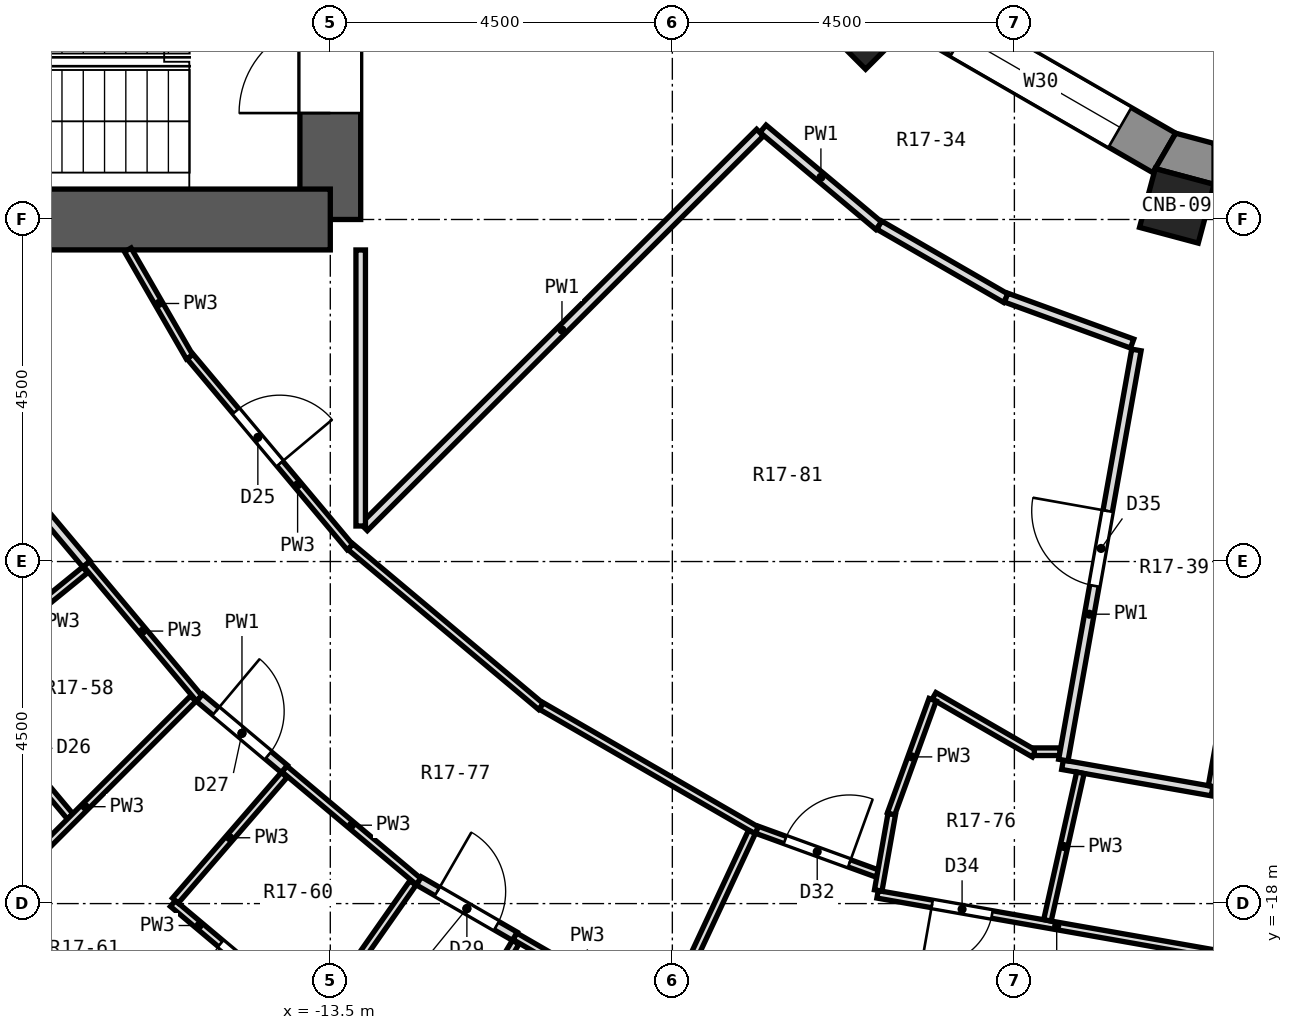
"""IFC4 building model, lengths in metres.
Left out: names, types, materials, properties, quantities, classifications, styles, units other than length and angle.
Written with IfcOpenShell. Run it as: python <this file> out.ifc"""

import sys

from ifc_helpers import new_model, si_unit, direction, frame, frame_2d, origin, origin_2d, place, context, subcontext, project, spatial, polyline, rectangle, outline, extrude, element, fill, save


model = new_model("IFC4")
c1 = context("Model", 3, precision=1e-05, world=origin(), true_north=direction((0.0, 1.0)))
c2 = subcontext(c1, "Body", "Model", "MODEL_VIEW")
j1 = project(units=[si_unit("LENGTHUNIT", "METRE"), si_unit("PLANEANGLEUNIT", "RADIAN")], contexts=[c1])
p1 = place(None, origin())
s1 = spatial("IfcSite", under=j1, at=p1, CompositionType="ELEMENT")
p2 = place(p1, origin())
s2 = spatial("IfcBuilding", under=s1, at=p2, CompositionType="ELEMENT")
p3 = place(p2, frame((0.0, 0.0, 91.9)))
s3 = spatial("IfcBuildingStorey", under=s2, at=p3, CompositionType="ELEMENT", Elevation=91.9)
for number, where, z_axis, x_axis in (
    (1, (-6.458, -6.458, 0.0), (0.0, 0.0, 1.0), (-0.707, -0.707, 0.0)),
    (2, (-2.364, -8.821, 0.0), (0.0, 0.0, 1.0), (-0.259, -0.966, 0.0)),
):
    element("IfcColumn", number, at=place(p3, frame(where, z_axis=z_axis, x_axis=x_axis)), inside=s3, PredefinedType="COLUMN", context=c2, shape_type="SweptSolid", body=[
        extrude(rectangle(XDim=0.8, YDim=0.8, at=origin_2d()), origin(), (0.0, 0.0, 1.0), 3.3),
    ])
p4 = place(p3, frame((-13.5, -9.0, 0.0), z_axis=(0.0, 0.0, 1.0), x_axis=(0.0, 1.0, 0.0)))
e3 = element("IfcWall", 3, at=p4, inside=s3, PredefinedType="SHEAR", context=c2, shape_type="SweptSolid", body=[
    extrude(rectangle(XDim=18.0, YDim=0.8, at=frame_2d((9.0, 0.0))), origin(), (0.0, 0.0, 1.0), 3.3),
])
p5 = place(p4, frame((15.4, 0.0, 0.0)))
e4 = element("IfcOpeningElement", 4, at=p5, cuts=e3, PredefinedType="OPENING", context=c2, shape_type="SweptSolid", body=[
    extrude(rectangle(XDim=1.2, YDim=2.1, at=frame_2d((0.6, 1.05))), frame((0.0, 0.412, 0.0), z_axis=(0.0, -1.0, 0.0), x_axis=(1.0, 0.0, 0.0)), (0.0, 0.0, 1.0), 0.824),
])
p6 = place(p4, frame((1.4, 0.0, 0.0)))
e5 = element("IfcOpeningElement", 5, at=p6, cuts=e3, PredefinedType="OPENING", context=c2, shape_type="SweptSolid", body=[
    extrude(rectangle(XDim=1.2, YDim=2.1, at=frame_2d((0.6, 1.05))), frame((0.0, 0.412, 0.0), z_axis=(0.0, -1.0, 0.0), x_axis=(1.0, 0.0, 0.0)), (0.0, 0.0, 1.0), 0.824),
])
p7 = place(p4, frame((7.5, 0.0, 0.0)))
e6 = element("IfcOpeningElement", 6, at=p7, cuts=e3, PredefinedType="OPENING", context=c2, shape_type="SweptSolid", body=[
    extrude(rectangle(XDim=3.0, YDim=2.4, at=frame_2d((1.5, 1.2))), frame((0.0, 0.412, 0.0), z_axis=(0.0, -1.0, 0.0), x_axis=(1.0, 0.0, 0.0)), (0.0, 0.0, 1.0), 0.824),
])
p8 = place(p3, frame((-13.5, -9.0, 0.0), z_axis=(0.0, 0.0, 1.0), x_axis=(-1.0, 0.0, 0.0)))
e7 = element("IfcWall", 7, at=p8, inside=s3, PredefinedType="SHEAR", context=c2, shape_type="SweptSolid", body=[
    extrude(rectangle(XDim=10.4, YDim=0.8, at=frame_2d((5.2, 0.0))), origin(), (0.0, 0.0, 1.0), 3.3),
])
p9 = place(p3, frame((-5.773, -6.251, 0.0), z_axis=(0.0, 0.0, 1.0), x_axis=(0.86604563398, -0.499964958637, 0.0)))
e8 = element("IfcWall", 8, at=p9, inside=s3, PredefinedType="SOLIDWALL", context=c2, shape_type="SweptSolid", body=[
    extrude(rectangle(XDim=3.747, YDim=0.6, at=frame_2d((1.874, 0.0))), origin(), (0.0, 0.0, 1.0), 2.8),
])
p10 = place(p9, frame((0.674, 0.0, 0.9)))
e9 = element("IfcOpeningElement", 9, at=p10, cuts=e8, PredefinedType="OPENING", context=c2, shape_type="SweptSolid", body=[
    extrude(rectangle(XDim=2.4, YDim=1.8, at=frame_2d((1.2, 0.9))), frame((0.0, 0.312, 0.0), z_axis=(0.0, -1.0, 0.0), x_axis=(1.0, 0.0, 0.0)), (0.0, 0.0, 1.0), 0.624),
])
p11 = place(p3, origin())
e10 = element("IfcWall", 10, at=p11, inside=s3, PredefinedType="SOLIDWALL", context=c2, shape_type="SweptSolid", body=[
    extrude(outline(polyline([(-1.874, -8.538), (-1.874, -8.0), (-2.377, -7.865), (-2.646, -8.331), (-1.874, -8.538)])), origin(), (0.0, 0.0, 1.0), 2.8),
])
p12 = place(p3, frame((-16.164, -9.4, 0.0), z_axis=(0.0, 0.0, 1.0), x_axis=(0.499687832671, -0.866205558676, 0.0)))
e11 = element("IfcWall", 11, at=p12, inside=s3, PredefinedType="PARTITIONING", context=c2, shape_type="SweptSolid", body=[
    extrude(rectangle(XDim=1.628, YDim=0.1, at=frame_2d((0.814, 0.0))), origin(), (0.0, 0.0, 1.0), 2.8),
])
p13 = place(p3, frame((-18.46, -15.022, 0.0), z_axis=(0.0, 0.0, 1.0), x_axis=(0.642942941421, -0.765914077477, 0.0)))
e12 = element("IfcWall", 12, at=p13, inside=s3, PredefinedType="PARTITIONING", context=c2, shape_type="SweptSolid", body=[
    extrude(rectangle(XDim=2.39, YDim=0.1, at=frame_2d((1.195, 0.0))), origin(), (0.0, 0.0, 1.0), 2.8),
])
p14 = place(p13, frame((0.821, 0.0, 0.0)))
e13 = element("IfcOpeningElement", 13, at=p14, cuts=e12, PredefinedType="OPENING", context=c2, shape_type="SweptSolid", body=[
    extrude(rectangle(XDim=0.8, YDim=2.1, at=frame_2d((0.4, 1.05))), frame((0.0, 0.062, 0.0), z_axis=(0.0, -1.0, 0.0), x_axis=(1.0, 0.0, 0.0)), (0.0, 0.0, 1.0), 0.124),
])
p15 = place(p3, frame((-16.708, -13.532, 0.0), z_axis=(0.0, 0.0, 1.0), x_axis=(0.642762571273, -0.766065452145, 0.0)))
e14 = element("IfcWall", 14, at=p15, inside=s3, PredefinedType="PARTITIONING", context=c2, shape_type="SweptSolid", body=[
    extrude(rectangle(XDim=2.307, YDim=0.1, at=frame_2d((1.153, 0.0))), origin(), (0.0, 0.0, 1.0), 2.8),
])
p16 = place(p3, frame((-17.637, -12.425, 0.0), z_axis=(0.0, 0.0, 1.0), x_axis=(0.642641061866, -0.766167387458, 0.0)))
e15 = element("IfcWall", 15, at=p16, inside=s3, PredefinedType="PARTITIONING", context=c2, shape_type="SweptSolid", body=[
    extrude(rectangle(XDim=1.445, YDim=0.125, at=frame_2d((0.722, 0.0))), origin(), (0.0, 0.0, 1.0), 2.8),
])
p17 = place(p3, frame((-15.344, -10.804, 0.0), z_axis=(0.0, 0.0, 1.0), x_axis=(0.642602374159, -0.766199836025, 0.0)))
e16 = element("IfcWall", 16, at=p17, inside=s3, PredefinedType="PARTITIONING", context=c2, shape_type="SweptSolid", body=[
    extrude(rectangle(XDim=3.273, YDim=0.1, at=frame_2d((1.636, 0.0))), origin(), (0.0, 0.0, 1.0), 2.8),
])
p18 = place(p17, frame((0.936, 0.0, 0.0)))
e17 = element("IfcOpeningElement", 17, at=p18, cuts=e16, PredefinedType="OPENING", context=c2, shape_type="SweptSolid", body=[
    extrude(rectangle(XDim=0.9, YDim=2.1, at=frame_2d((0.45, 1.05))), frame((0.0, 0.062, 0.0), z_axis=(0.0, -1.0, 0.0), x_axis=(1.0, 0.0, 0.0)), (0.0, 0.0, 1.0), 0.124),
])
p19 = place(p3, frame((-15.571, -17.999, 0.0), z_axis=(0.0, 0.0, 1.0), x_axis=(0.765914077477, -0.642942941421, 0.0)))
e18 = element("IfcWall", 18, at=p19, inside=s3, PredefinedType="PARTITIONING", context=c2, shape_type="SweptSolid", body=[
    extrude(rectangle(XDim=2.39, YDim=0.1, at=frame_2d((1.195, 0.0))), origin(), (0.0, 0.0, 1.0), 2.8),
])
p20 = place(p19, frame((0.82, 0.0, 0.0)))
e19 = element("IfcOpeningElement", 19, at=p20, cuts=e18, PredefinedType="OPENING", context=c2, shape_type="SweptSolid", body=[
    extrude(rectangle(XDim=0.8, YDim=2.1, at=frame_2d((0.4, 1.05))), frame((0.0, 0.062, 0.0), z_axis=(0.0, -1.0, 0.0), x_axis=(1.0, 0.0, 0.0)), (0.0, 0.0, 1.0), 0.124),
])
p21 = place(p3, frame((-14.104, -16.228, 0.0), z_axis=(0.0, 0.0, 1.0), x_axis=(0.76604687987, -0.642784705669, 0.0)))
e20 = element("IfcWall", 20, at=p21, inside=s3, PredefinedType="PARTITIONING", context=c2, shape_type="SweptSolid", body=[
    extrude(rectangle(XDim=2.305, YDim=0.1, at=frame_2d((1.153, 0.0))), origin(), (0.0, 0.0, 1.0), 2.8),
])
p22 = place(p3, frame((-15.22, -15.292, 0.0), z_axis=(0.0, 0.0, 1.0), x_axis=(0.766114305984, -0.642704341177, 0.0)))
e21 = element("IfcWall", 21, at=p22, inside=s3, PredefinedType="PARTITIONING", context=c2, shape_type="SweptSolid", body=[
    extrude(rectangle(XDim=1.456, YDim=0.125, at=frame_2d((0.728, 0.0))), origin(), (0.0, 0.0, 1.0), 2.8),
])
p23 = place(p22, frame((0.278, 0.0, 0.0)))
e22 = element("IfcOpeningElement", 22, at=p23, cuts=e21, PredefinedType="OPENING", context=c2, shape_type="SweptSolid", body=[
    extrude(rectangle(XDim=0.9, YDim=2.1, at=frame_2d((0.45, 1.05))), frame((0.0, 0.074, 0.0), z_axis=(0.0, -1.0, 0.0), x_axis=(1.0, 0.0, 0.0)), (0.0, 0.0, 1.0), 0.149),
])
p24 = place(p3, frame((-13.235, -13.305, 0.0), z_axis=(0.0, 0.0, 1.0), x_axis=(0.766132303871, -0.642682886784, 0.0)))
e23 = element("IfcWall", 23, at=p24, inside=s3, PredefinedType="PARTITIONING", context=c2, shape_type="SweptSolid", body=[
    extrude(rectangle(XDim=3.273, YDim=0.1, at=frame_2d((1.636, 0.0))), origin(), (0.0, 0.0, 1.0), 2.8),
])
p25 = place(p3, frame((-7.807, -7.806, 0.0), z_axis=(0.0, 0.0, 1.0), x_axis=(0.766164240715, -0.642644813446, 0.0)))
e24 = element("IfcWall", 24, at=p25, inside=s3, PredefinedType="PARTITIONING", context=c2, shape_type="SweptSolid", body=[
    extrude(rectangle(XDim=1.988, YDim=0.125, at=frame_2d((0.994, 0.0))), origin(), (0.0, 0.0, 1.0), 2.8),
])
p26 = place(p3, frame((-11.072, -18.43, 0.0), z_axis=(0.0, 0.0, 1.0), x_axis=(0.865848017448, -0.500307116361, 0.0)))
e25 = element("IfcWall", 25, at=p26, inside=s3, PredefinedType="PARTITIONING", context=c2, shape_type="SweptSolid", body=[
    extrude(rectangle(XDim=2.205, YDim=0.1, at=frame_2d((1.102, 0.0))), origin(), (0.0, 0.0, 1.0), 2.8),
])
p27 = place(p3, frame((-12.334, -17.702, 0.0), z_axis=(0.0, 0.0, 1.0), x_axis=(0.866110229381, -0.499853048967, 0.0)))
e26 = element("IfcWall", 26, at=p27, inside=s3, PredefinedType="PARTITIONING", context=c2, shape_type="SweptSolid", body=[
    extrude(rectangle(XDim=1.457, YDim=0.125, at=frame_2d((0.728, 0.0))), origin(), (0.0, 0.0, 1.0), 2.8),
])
p28 = place(p27, frame((0.278, 0.0, 0.0)))
e27 = element("IfcOpeningElement", 27, at=p28, cuts=e26, PredefinedType="OPENING", context=c2, shape_type="SweptSolid", body=[
    extrude(rectangle(XDim=0.9, YDim=2.1, at=frame_2d((0.45, 1.05))), frame((0.0, 0.074, 0.0), z_axis=(0.0, -1.0, 0.0), x_axis=(1.0, 0.0, 0.0)), (0.0, 0.0, 1.0), 0.149),
])
p29 = place(p3, frame((-10.723, -15.401, 0.0), z_axis=(0.0, 0.0, 1.0), x_axis=(0.866002935623, -0.500038913978, 0.0)))
e28 = element("IfcWall", 28, at=p29, inside=s3, PredefinedType="PARTITIONING", context=c2, shape_type="SweptSolid", body=[
    extrude(rectangle(XDim=3.272, YDim=0.1, at=frame_2d((1.636, 0.0))), origin(), (0.0, 0.0, 1.0), 2.8),
])
p30 = place(p3, frame((-5.557, -15.267, 0.0), z_axis=(0.0, 0.0, 1.0), x_axis=(0.866084140742, -0.499898250802, 0.0)))
e29 = element("IfcWall", 29, at=p30, inside=s3, PredefinedType="PARTITIONING", context=c2, shape_type="SweptSolid", body=[
    extrude(rectangle(XDim=1.523, YDim=0.1, at=frame_2d((0.761, 0.0))), origin(), (0.0, 0.0, 1.0), 2.8),
])
p31 = place(p3, frame((-6.278, -9.074, 0.0), z_axis=(0.0, 0.0, 1.0), x_axis=(0.865970077019, -0.500095816526, 0.0)))
e30 = element("IfcWall", 30, at=p31, inside=s3, PredefinedType="PARTITIONING", context=c2, shape_type="SweptSolid", body=[
    extrude(rectangle(XDim=1.924, YDim=0.125, at=frame_2d((0.962, 0.0))), origin(), (0.0, 0.0, 1.0), 2.8),
])
p32 = place(p3, frame((-7.886, -17.029, 0.0), z_axis=(0.0, 0.0, 1.0), x_axis=(0.939806110693, -0.341708171258, 0.0)))
e31 = element("IfcWall", 31, at=p32, inside=s3, PredefinedType="PARTITIONING", context=c2, shape_type="SweptSolid", body=[
    extrude(rectangle(XDim=1.686, YDim=0.1, at=frame_2d((0.843, 0.0))), origin(), (0.0, 0.0, 1.0), 2.8),
])
p33 = place(p32, frame((0.393, 0.0, 0.0)))
e32 = element("IfcOpeningElement", 32, at=p33, cuts=e31, PredefinedType="OPENING", context=c2, shape_type="SweptSolid", body=[
    extrude(rectangle(XDim=0.9, YDim=2.1, at=frame_2d((0.45, 1.05))), frame((0.0, 0.062, 0.0), z_axis=(0.0, -1.0, 0.0), x_axis=(1.0, 0.0, 0.0)), (0.0, 0.0, 1.0), 0.124),
])
p34 = place(p3, frame((-4.608, -10.028, 0.0), z_axis=(0.0, 0.0, 1.0), x_axis=(0.939587139824, -0.342309810958, 0.0)))
e33 = element("IfcWall", 33, at=p34, inside=s3, PredefinedType="PARTITIONING", context=c2, shape_type="SweptSolid", body=[
    extrude(rectangle(XDim=1.764, YDim=0.125, at=frame_2d((0.882, 0.0))), origin(), (0.0, 0.0, 1.0), 2.8),
])
p35 = place(p3, frame((-6.3, -17.878, 0.0), z_axis=(0.0, 0.0, 1.0), x_axis=(0.984813837489, -0.173613667348, 0.0)))
e34 = element("IfcWall", 34, at=p35, inside=s3, PredefinedType="PARTITIONING", context=c2, shape_type="SweptSolid", body=[
    extrude(rectangle(XDim=4.787, YDim=0.1, at=frame_2d((2.394, 0.0))), origin(), (0.0, 0.0, 1.0), 2.8),
])
p36 = place(p35, frame((0.729, 0.0, 0.0)))
e35 = element("IfcOpeningElement", 35, at=p36, cuts=e34, PredefinedType="OPENING", context=c2, shape_type="SweptSolid", body=[
    extrude(rectangle(XDim=0.8, YDim=2.1, at=frame_2d((0.4, 1.05))), frame((0.0, 0.062, 0.0), z_axis=(0.0, -1.0, 0.0), x_axis=(1.0, 0.0, 0.0)), (0.0, 0.0, 1.0), 0.124),
])
p37 = place(p3, frame((-3.867, -16.174, 0.0), z_axis=(0.0, 0.0, 1.0), x_axis=(0.984836400178, -0.173485633079, 0.0)))
e36 = element("IfcWall", 36, at=p37, inside=s3, PredefinedType="PARTITIONING", context=c2, shape_type="SweptSolid", body=[
    extrude(rectangle(XDim=1.998, YDim=0.125, at=frame_2d((0.999, 0.0))), origin(), (0.0, 0.0, 1.0), 2.8),
])
p38 = place(p3, frame((-4.238, -16.002, 0.0), z_axis=(0.0, 0.0, 1.0), x_axis=(1.0, 0.0, 0.0)))
e37 = element("IfcWall", 37, at=p38, inside=s3, PredefinedType="PARTITIONING", context=c2, shape_type="SweptSolid", body=[
    extrude(rectangle(XDim=0.339, YDim=0.1, at=frame_2d((0.169, 0.0))), origin(), (0.0, 0.0, 1.0), 2.8),
])
p39 = place(p3, frame((-18.419, -14.989, 0.0), z_axis=(0.0, 0.0, 1.0), x_axis=(0.775583643893, 0.63124481093, 0.0)))
e38 = element("IfcWall", 38, at=p39, inside=s3, PredefinedType="PARTITIONING", context=c2, shape_type="SweptSolid", body=[
    extrude(rectangle(XDim=2.184, YDim=0.1, at=frame_2d((1.092, 0.0))), origin(), (0.0, 0.0, 1.0), 2.8),
])
p40 = place(p3, frame((-13.057, -13.049, 0.0), z_axis=(0.0, 0.0, 1.0), x_axis=(0.708367099834, 0.705844212183, 0.0)))
e39 = element("IfcWall", 39, at=p40, inside=s3, PredefinedType="PARTITIONING", context=c2, shape_type="SweptSolid", body=[
    extrude(rectangle(XDim=7.354, YDim=0.125, at=frame_2d((3.677, 0.0))), origin(), (0.0, 0.0, 1.0), 2.8),
])
p41 = place(p3, frame((-18.148, -18.148, 0.0), z_axis=(0.0, 0.0, 1.0), x_axis=(0.707106781187, 0.707106781187, 0.0)))
e40 = element("IfcWall", 40, at=p41, inside=s3, PredefinedType="PARTITIONING", context=c2, shape_type="SweptSolid", body=[
    extrude(rectangle(XDim=4.023, YDim=0.1, at=frame_2d((2.011, 0.0))), origin(), (0.0, 0.0, 1.0), 2.8),
])
p42 = place(p3, frame((-15.538, -17.961, 0.0), z_axis=(0.0, 0.0, 1.0), x_axis=(0.654433202149, 0.756119821143, 0.0)))
e41 = element("IfcWall", 41, at=p42, inside=s3, PredefinedType="PARTITIONING", context=c2, shape_type="SweptSolid", body=[
    extrude(rectangle(XDim=2.187, YDim=0.1, at=frame_2d((1.094, 0.0))), origin(), (0.0, 0.0, 1.0), 2.8),
])
p43 = place(p3, frame((-14.721, -21.023, 0.0), z_axis=(0.0, 0.0, 1.0), x_axis=(0.573849206175, 0.818960981105, 0.0)))
e42 = element("IfcWall", 42, at=p43, inside=s3, PredefinedType="PARTITIONING", context=c2, shape_type="SweptSolid", body=[
    extrude(rectangle(XDim=4.023, YDim=0.1, at=frame_2d((2.011, 0.0))), origin(), (0.0, 0.0, 1.0), 2.8),
])
p44 = place(p3, frame((-12.183, -20.387, 0.0), z_axis=(0.0, 0.0, 1.0), x_axis=(0.512903306279, 0.85844638645, 0.0)))
e43 = element("IfcWall", 43, at=p44, inside=s3, PredefinedType="PARTITIONING", context=c2, shape_type="SweptSolid", body=[
    extrude(rectangle(XDim=2.188, YDim=0.1, at=frame_2d((1.094, 0.0))), origin(), (0.0, 0.0, 1.0), 2.8),
])
p45 = place(p3, frame((-10.848, -23.26, 0.0), z_axis=(0.0, 0.0, 1.0), x_axis=(0.422908898334, 0.906172204225, 0.0)))
e44 = element("IfcWall", 44, at=p45, inside=s3, PredefinedType="PARTITIONING", context=c2, shape_type="SweptSolid", body=[
    extrude(rectangle(XDim=6.844, YDim=0.1, at=frame_2d((3.422, 0.0))), origin(), (0.0, 0.0, 1.0), 2.8),
])
p46 = place(p3, frame((-6.123, -16.823, 0.0), z_axis=(0.0, 0.0, 1.0), x_axis=(0.342085762609, 0.939668734725, 0.0)))
e45 = element("IfcWall", 45, at=p46, inside=s3, PredefinedType="PARTITIONING", context=c2, shape_type="SweptSolid", body=[
    extrude(rectangle(XDim=1.602, YDim=0.1, at=frame_2d((0.801, 0.0))), origin(), (0.0, 0.0, 1.0), 2.8),
])
p47 = place(p3, frame((-4.065, -18.22, 0.0), z_axis=(0.0, 0.0, 1.0), x_axis=(0.218112956179, 0.975923530994, 0.0)))
e46 = element("IfcWall", 46, at=p47, inside=s3, PredefinedType="PARTITIONING", context=c2, shape_type="SweptSolid", body=[
    extrude(rectangle(XDim=1.989, YDim=0.1, at=frame_2d((0.995, 0.0))), origin(), (0.0, 0.0, 1.0), 2.8),
])
p48 = place(p3, frame((-1.887, -16.459, 0.0), z_axis=(0.0, 0.0, 1.0), x_axis=(0.175533190832, 0.984473513568, 0.0)))
e47 = element("IfcWall", 47, at=p48, inside=s3, PredefinedType="PARTITIONING", context=c2, shape_type="SweptSolid", body=[
    extrude(rectangle(XDim=5.481, YDim=0.125, at=frame_2d((2.741, 0.0))), origin(), (0.0, 0.0, 1.0), 2.8),
])
p49 = place(p3, frame((-3.856, -16.113, 0.0), z_axis=(0.0, 0.0, 1.0), x_axis=(0.175360511149, 0.984504287004, 0.0)))
e48 = element("IfcWall", 48, at=p49, inside=s3, PredefinedType="PARTITIONING", context=c2, shape_type="SweptSolid", body=[
    extrude(rectangle(XDim=5.481, YDim=0.125, at=frame_2d((2.741, 0.0))), origin(), (0.0, 0.0, 1.0), 2.8),
])
p50 = place(p49, frame((2.329, 0.0, 0.0)))
e49 = element("IfcOpeningElement", 49, at=p50, cuts=e48, PredefinedType="OPENING", context=c2, shape_type="SweptSolid", body=[
    extrude(rectangle(XDim=1.0, YDim=2.1, at=frame_2d((0.5, 1.05))), frame((0.0, 0.074, 0.0), z_axis=(0.0, -1.0, 0.0), x_axis=(1.0, 0.0, 0.0)), (0.0, 0.0, 1.0), 0.149),
])
p51 = place(p3, frame((-6.292, -17.828, 0.0), z_axis=(0.0, 0.0, 1.0), x_axis=(0.174455149241, 0.984665121198, 0.0)))
e50 = element("IfcWall", 50, at=p51, inside=s3, PredefinedType="PARTITIONING", context=c2, shape_type="SweptSolid", body=[
    extrude(rectangle(XDim=1.019, YDim=0.1, at=frame_2d((0.509, 0.0))), origin(), (0.0, 0.0, 1.0), 2.8),
])
p52 = place(p3, frame((-13.1, -13.032, 0.0), z_axis=(0.0, 0.0, 1.0), x_axis=(0.0, 1.0, 0.0)))
e51 = element("IfcWall", 51, at=p52, inside=s3, PredefinedType="PARTITIONING", context=c2, shape_type="SweptSolid", body=[
    extrude(rectangle(XDim=3.632, YDim=0.125, at=frame_2d((1.816, 0.0))), origin(), (0.0, 0.0, 1.0), 2.8),
])
p53 = place(p10, origin())
e52 = element("IfcWindow", 52, at=p53, inside=s3, PartitioningType="SINGLE_PANEL", PredefinedType="WINDOW", context=c2, shape_type="SweptSolid", body=[
    extrude(rectangle(XDim=2.4, YDim=1.8, at=frame_2d((1.2, 0.9))), frame((0.0, -0.12, 0.0), z_axis=(0.0, -1.0, 0.0), x_axis=(1.0, 0.0, 0.0)), (0.0, 0.0, 1.0), 0.06),
])
fill(e9, e52)
p54 = place(p18, origin())
e53 = element("IfcDoor", 53, at=p54, inside=s3, OperationType="SINGLE_SWING_RIGHT", PredefinedType="DOOR", context=c2, shape_type="SweptSolid", body=[
    extrude(rectangle(XDim=0.9, YDim=2.1, at=frame_2d((0.45, 1.05))), frame((0.0, 0.025, 0.0), z_axis=(0.0, -1.0, 0.0), x_axis=(1.0, 0.0, 0.0)), (0.0, 0.0, 1.0), 0.05),
])
fill(e17, e53)
p55 = place(p23, origin())
e54 = element("IfcDoor", 54, at=p55, inside=s3, OperationType="SINGLE_SWING_LEFT", PredefinedType="DOOR", context=c2, shape_type="SweptSolid", body=[
    extrude(rectangle(XDim=0.9, YDim=2.1, at=frame_2d((0.45, 1.05))), frame((0.0, 0.025, 0.0), z_axis=(0.0, -1.0, 0.0), x_axis=(1.0, 0.0, 0.0)), (0.0, 0.0, 1.0), 0.05),
])
fill(e22, e54)
p56 = place(p20, frame((0.8, 0.0, 0.0), z_axis=(0.0, 0.0, 1.0), x_axis=(-1.0, 0.0, 0.0)))
e55 = element("IfcDoor", 55, at=p56, inside=s3, OperationType="SINGLE_SWING_LEFT", PredefinedType="DOOR", context=c2, shape_type="SweptSolid", body=[
    extrude(rectangle(XDim=0.8, YDim=2.1, at=frame_2d((0.4, 1.05))), frame((0.0, 0.025, 0.0), z_axis=(0.0, -1.0, 0.0), x_axis=(1.0, 0.0, 0.0)), (0.0, 0.0, 1.0), 0.05),
])
fill(e19, e55)
p57 = place(p28, origin())
e56 = element("IfcDoor", 56, at=p57, inside=s3, OperationType="SINGLE_SWING_LEFT", PredefinedType="DOOR", context=c2, shape_type="SweptSolid", body=[
    extrude(rectangle(XDim=0.9, YDim=2.1, at=frame_2d((0.45, 1.05))), frame((0.0, 0.025, 0.0), z_axis=(0.0, -1.0, 0.0), x_axis=(1.0, 0.0, 0.0)), (0.0, 0.0, 1.0), 0.05),
])
fill(e27, e56)
p58 = place(p33, origin())
e57 = element("IfcDoor", 57, at=p58, inside=s3, OperationType="SINGLE_SWING_RIGHT", PredefinedType="DOOR", context=c2, shape_type="SweptSolid", body=[
    extrude(rectangle(XDim=0.9, YDim=2.1, at=frame_2d((0.45, 1.05))), frame((0.0, 0.025, 0.0), z_axis=(0.0, -1.0, 0.0), x_axis=(1.0, 0.0, 0.0)), (0.0, 0.0, 1.0), 0.05),
])
fill(e32, e57)
p59 = place(p36, frame((0.8, 0.0, 0.0), z_axis=(0.0, 0.0, 1.0), x_axis=(-1.0, 0.0, 0.0)))
e58 = element("IfcDoor", 58, at=p59, inside=s3, OperationType="SINGLE_SWING_RIGHT", PredefinedType="DOOR", context=c2, shape_type="SweptSolid", body=[
    extrude(rectangle(XDim=0.8, YDim=2.1, at=frame_2d((0.4, 1.05))), frame((0.0, 0.025, 0.0), z_axis=(0.0, -1.0, 0.0), x_axis=(1.0, 0.0, 0.0)), (0.0, 0.0, 1.0), 0.05),
])
fill(e35, e58)
p60 = place(p50, origin())
e59 = element("IfcDoor", 59, at=p60, inside=s3, OperationType="SINGLE_SWING_RIGHT", PredefinedType="DOOR", context=c2, shape_type="SweptSolid", body=[
    extrude(rectangle(XDim=1.0, YDim=2.1, at=frame_2d((0.5, 1.05))), frame((0.0, 0.025, 0.0), z_axis=(0.0, -1.0, 0.0), x_axis=(1.0, 0.0, 0.0)), (0.0, 0.0, 1.0), 0.05),
])
fill(e49, e59)
p61 = place(p6, origin())
e60 = element("IfcDoor", 60, at=p61, inside=s3, OperationType="SINGLE_SWING_LEFT", PredefinedType="DOOR", context=c2, shape_type="SweptSolid", body=[
    extrude(rectangle(XDim=1.2, YDim=2.1, at=frame_2d((0.6, 1.05))), frame((0.0, 0.025, 0.0), z_axis=(0.0, -1.0, 0.0), x_axis=(1.0, 0.0, 0.0)), (0.0, 0.0, 1.0), 0.05),
])
fill(e5, e60)
save(model, sys.argv[1])
